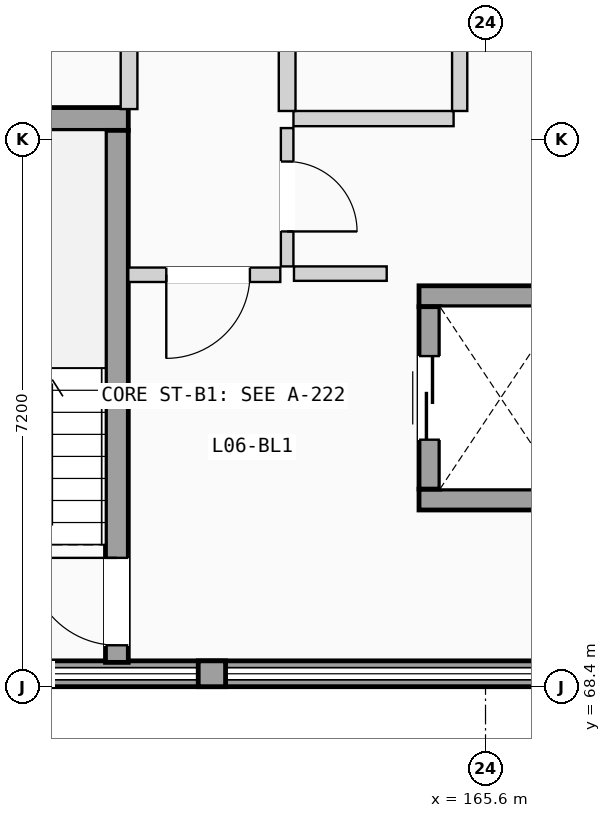
"""IFC4 building model, lengths in metres.
Left out: names, types, materials, properties, quantities, classifications, styles, units other than length and angle.
Written with IfcOpenShell. Run it as: python <this file> out.ifc"""

import sys

from ifc_helpers import new_model, si_unit, direction, frame, frame_2d, origin, place, context, subcontext, project, spatial, rectangle, extrude, element, fill, save


model = new_model("IFC4")
c1 = context("Model", 3, precision=1e-05, world=origin(), true_north=direction((0.0, 1.0)))
c2 = subcontext(c1, "Body", "Model", "MODEL_VIEW")
j1 = project(units=[si_unit("LENGTHUNIT", "METRE"), si_unit("PLANEANGLEUNIT", "RADIAN")], contexts=[c1])
p1 = place(None, origin())
s1 = spatial("IfcSite", under=j1, at=p1, CompositionType="ELEMENT")
p2 = place(p1, origin())
s2 = spatial("IfcBuilding", under=s1, at=p2, CompositionType="ELEMENT")
p3 = place(p2, frame((0.0, 0.0, 21.525)))
s3 = spatial("IfcBuildingStorey", under=s2, at=p3, CompositionType="ELEMENT", Elevation=21.525)
p4 = place(p3, frame((151.2, 68.57, 0.0), z_axis=(0.0, 0.0, 1.0), x_axis=(1.0, 0.0, 0.0)))
e1 = element("IfcWall", 1, at=p4, inside=s3, PredefinedType="SOLIDWALL", context=c2, shape_type="SweptSolid", body=[
    extrude(rectangle(XDim=21.6, YDim=0.34, at=frame_2d((10.8, 0.0))), origin(), (0.0, 0.0, 1.0), 1.11),
])
p5 = place(p3, frame((161.82, 68.57, 1.11), z_axis=(0.0, 0.0, 1.0), x_axis=(1.0, 0.0, 0.0)))
e2 = element("IfcWall", 2, at=p5, inside=s3, PredefinedType="SOLIDWALL", context=c2, shape_type="SweptSolid", body=[
    extrude(rectangle(XDim=0.36, YDim=0.34, at=frame_2d((0.18, 0.0))), origin(), (0.0, 0.0, 1.0), 1.78),
])
p6 = place(p3, frame((156.9, 75.87, 0.0), z_axis=(0.0, 0.0, 1.0), x_axis=(1.0, 0.0, 0.0)))
e3 = element("IfcWall", 3, at=p6, inside=s3, PredefinedType="SHEAR", context=c2, shape_type="SweptSolid", body=[
    extrude(rectangle(XDim=4.0, YDim=0.3, at=frame_2d((2.0, 0.0))), origin(), (0.0, 0.0, 1.0), 2.89),
])
p7 = place(p3, frame((160.75, 68.72, 0.0), z_axis=(0.0, 0.0, 1.0), x_axis=(0.0, 1.0, 0.0)))
e4 = element("IfcWall", 4, at=p7, inside=s3, PredefinedType="SHEAR", context=c2, shape_type="SweptSolid", body=[
    extrude(rectangle(XDim=7.0, YDim=0.3, at=frame_2d((3.5, 0.0))), origin(), (0.0, 0.0, 1.0), 2.89),
])
p8 = place(p7, frame((0.225, 0.0, 0.0)))
e5 = element("IfcOpeningElement", 5, at=p8, cuts=e4, PredefinedType="OPENING", context=c2, shape_type="SweptSolid", body=[
    extrude(rectangle(XDim=1.15, YDim=2.12, at=frame_2d((0.575, 1.06))), frame((0.0, 0.16, 0.0), z_axis=(0.0, -1.0, 0.0), x_axis=(1.0, 0.0, 0.0)), (0.0, 0.0, 1.0), 0.32),
])
for number, where, z_axis, x_axis in (
    (6, (164.725, 70.863, 0.0), (0.0, 0.0, 1.0), (1.0, 0.0, 0.0)),
    (7, (164.725, 73.538, 0.0), (0.0, 0.0, 1.0), (1.0, 0.0, 0.0)),
):
    element("IfcWall", number, at=place(p3, frame(where, z_axis=z_axis, x_axis=x_axis)), inside=s3, PredefinedType="SHEAR", context=c2, shape_type="SweptSolid", body=[
        extrude(rectangle(XDim=2.15, YDim=0.275, at=frame_2d((1.075, 0.0))), origin(), (0.0, 0.0, 1.0), 2.89),
    ])
p9 = place(p3, frame((164.863, 71.0, 0.0), z_axis=(0.0, 0.0, 1.0), x_axis=(0.0, 1.0, 0.0)))
e8 = element("IfcWall", 8, at=p9, inside=s3, PredefinedType="SHEAR", context=c2, shape_type="SweptSolid", body=[
    extrude(rectangle(XDim=2.4, YDim=0.275, at=frame_2d((1.2, 0.0))), origin(), (0.0, 0.0, 1.0), 2.89),
])
p10 = place(p9, frame((0.65, 0.0, 0.0)))
e9 = element("IfcOpeningElement", 9, at=p10, cuts=e8, PredefinedType="OPENING", context=c2, shape_type="SweptSolid", body=[
    extrude(rectangle(XDim=1.1, YDim=2.15, at=frame_2d((0.55, 1.075))), frame((0.0, 0.147, 0.0), z_axis=(0.0, -1.0, 0.0), x_axis=(1.0, 0.0, 0.0)), (0.0, 0.0, 1.0), 0.295),
])
p11 = place(p3, frame((163.08, 73.835, 0.0), z_axis=(0.0, 0.0, 1.0), x_axis=(1.0, 0.0, 0.0)))
e10 = element("IfcWall", 10, at=p11, inside=s3, PredefinedType="PARTITIONING", context=c2, shape_type="SweptSolid", body=[
    extrude(rectangle(XDim=1.22, YDim=0.19, at=frame_2d((0.61, 0.0))), origin(), (0.0, 0.0, 1.0), 2.87),
])
p12 = place(p3, frame((160.9, 73.82, 0.0), z_axis=(0.0, 0.0, 1.0), x_axis=(1.0, 0.0, 0.0)))
e11 = element("IfcWall", 11, at=p12, inside=s3, PredefinedType="PARTITIONING", context=c2, shape_type="SweptSolid", body=[
    extrude(rectangle(XDim=2.0, YDim=0.19, at=frame_2d((1.0, 0.0))), origin(), (0.0, 0.0, 1.0), 2.87),
])
p13 = place(p12, frame((0.5, 0.0, 0.0)))
e12 = element("IfcOpeningElement", 12, at=p13, cuts=e11, PredefinedType="OPENING", context=c2, shape_type="SweptSolid", body=[
    extrude(rectangle(XDim=1.1, YDim=2.12, at=frame_2d((0.55, 1.06))), frame((0.0, 0.105, 0.0), z_axis=(0.0, -1.0, 0.0), x_axis=(1.0, 0.0, 0.0)), (0.0, 0.0, 1.0), 0.21),
])
p14 = place(p3, frame((162.99, 73.93, 0.0), z_axis=(0.0, 0.0, 1.0), x_axis=(0.0, 1.0, 0.0)))
e13 = element("IfcWall", 13, at=p14, inside=s3, PredefinedType="PARTITIONING", context=c2, shape_type="SweptSolid", body=[
    extrude(rectangle(XDim=1.82, YDim=0.165, at=frame_2d((0.91, 0.0))), origin(), (0.0, 0.0, 1.0), 2.87),
])
p15 = place(p14, frame((0.46, 0.0, 0.0)))
e14 = element("IfcOpeningElement", 14, at=p15, cuts=e13, PredefinedType="OPENING", context=c2, shape_type="SweptSolid", body=[
    extrude(rectangle(XDim=0.92, YDim=2.04, at=frame_2d((0.46, 1.02))), frame((0.0, 0.093, 0.0), z_axis=(0.0, -1.0, 0.0), x_axis=(1.0, 0.0, 0.0)), (0.0, 0.0, 1.0), 0.185),
])
p16 = place(p3, frame((163.073, 75.875, 0.0), z_axis=(0.0, 0.0, 1.0), x_axis=(1.0, 0.0, 0.0)))
e15 = element("IfcWall", 15, at=p16, inside=s3, PredefinedType="PLUMBINGWALL", context=c2, shape_type="SweptSolid", body=[
    extrude(rectangle(XDim=2.107, YDim=0.2, at=frame_2d((1.053, 0.0))), origin(), (0.0, 0.0, 1.0), 2.87),
])
p17 = place(p3, frame((160.91, 76.0, 0.0), z_axis=(0.0, 0.0, 1.0), x_axis=(0.0, 1.0, 0.0)))
e16 = element("IfcWall", 16, at=p17, inside=s3, PredefinedType="PLUMBINGWALL", context=c2, shape_type="SweptSolid", body=[
    extrude(rectangle(XDim=3.493, YDim=0.22, at=frame_2d((1.747, 0.0))), origin(), (0.0, 0.0, 1.0), 2.87),
])
p18 = place(p3, frame((162.99, 75.975, 0.0), z_axis=(0.0, 0.0, 1.0), x_axis=(0.0, 1.0, 0.0)))
e17 = element("IfcWall", 17, at=p18, inside=s3, PredefinedType="PLUMBINGWALL", context=c2, shape_type="SweptSolid", body=[
    extrude(rectangle(XDim=3.518, YDim=0.22, at=frame_2d((1.759, 0.0))), origin(), (0.0, 0.0, 1.0), 2.87),
])
p19 = place(p3, frame((165.26, 75.975, 0.0), z_axis=(0.0, 0.0, 1.0), x_axis=(0.0, 1.0, 0.0)))
e18 = element("IfcWall", 18, at=p19, inside=s3, PredefinedType="PLUMBINGWALL", context=c2, shape_type="SweptSolid", body=[
    extrude(rectangle(XDim=3.518, YDim=0.2, at=frame_2d((1.759, 0.0))), origin(), (0.0, 0.0, 1.0), 2.87),
])
p20 = place(p8, origin())
e19 = element("IfcDoor", 19, at=p20, inside=s3, OperationType="SINGLE_SWING_RIGHT", PredefinedType="DOOR", context=c2, shape_type="SweptSolid", body=[
    extrude(rectangle(XDim=1.15, YDim=2.12, at=frame_2d((0.575, 1.06))), frame((0.0, 0.025, 0.0), z_axis=(0.0, -1.0, 0.0), x_axis=(1.0, 0.0, 0.0)), (0.0, 0.0, 1.0), 0.05),
])
fill(e5, e19)
p21 = place(p10, origin())
e20 = element("IfcDoor", 20, at=p21, inside=s3, OperationType="SLIDING_TO_LEFT", PredefinedType="DOOR", context=c2, shape_type="SweptSolid", body=[
    extrude(rectangle(XDim=1.1, YDim=2.15, at=frame_2d((0.55, 1.075))), frame((0.0, 0.025, 0.0), z_axis=(0.0, -1.0, 0.0), x_axis=(1.0, 0.0, 0.0)), (0.0, 0.0, 1.0), 0.05),
])
fill(e9, e20)
p22 = place(p13, frame((1.1, 0.0, 0.0), z_axis=(0.0, 0.0, 1.0), x_axis=(-1.0, 0.0, 0.0)))
e21 = element("IfcDoor", 21, at=p22, inside=s3, OperationType="SINGLE_SWING_LEFT", PredefinedType="DOOR", context=c2, shape_type="SweptSolid", body=[
    extrude(rectangle(XDim=1.1, YDim=2.12, at=frame_2d((0.55, 1.06))), frame((0.0, 0.025, 0.0), z_axis=(0.0, -1.0, 0.0), x_axis=(1.0, 0.0, 0.0)), (0.0, 0.0, 1.0), 0.05),
])
fill(e12, e21)
p23 = place(p15, frame((0.92, 0.0, 0.0), z_axis=(0.0, 0.0, 1.0), x_axis=(-1.0, 0.0, 0.0)))
e22 = element("IfcDoor", 22, at=p23, inside=s3, OperationType="SINGLE_SWING_LEFT", PredefinedType="DOOR", context=c2, shape_type="SweptSolid", body=[
    extrude(rectangle(XDim=0.92, YDim=2.04, at=frame_2d((0.46, 1.02))), frame((0.0, 0.025, 0.0), z_axis=(0.0, -1.0, 0.0), x_axis=(1.0, 0.0, 0.0)), (0.0, 0.0, 1.0), 0.05),
])
fill(e14, e22)
save(model, sys.argv[1])
